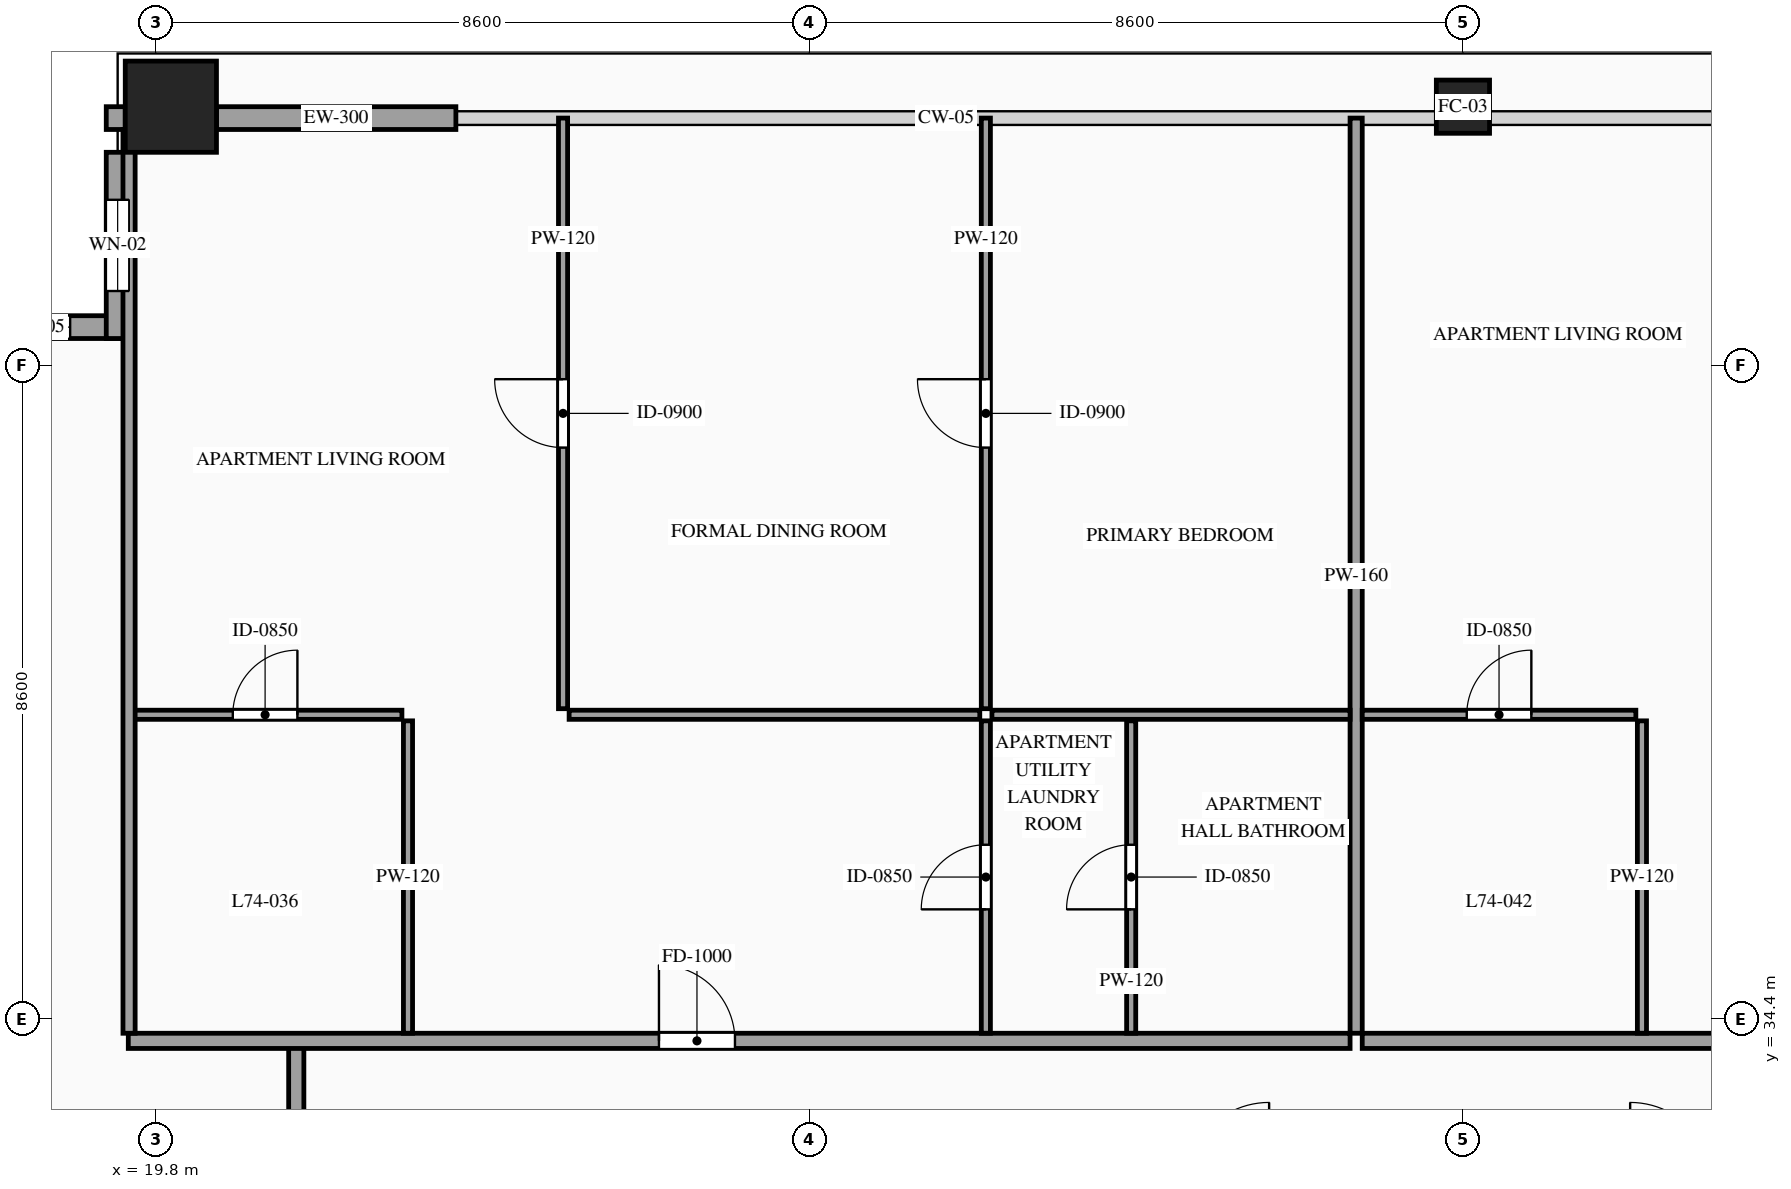
"""IFC4 building model, lengths in metres.
Left out: names, types, materials, properties, quantities, classifications, styles, units other than length and angle.
Written with IfcOpenShell. Run it as: python <this file> out.ifc"""

import sys

from ifc_helpers import new_model, si_unit, direction, frame, frame_2d, origin, origin_2d, place, context, subcontext, project, spatial, rectangle, hollow_rectangle, extrude, source, transform, mapped, element, fill, save


model = new_model("IFC4")
c1 = context("Model", 3, precision=1e-05, world=origin(), true_north=direction((0.0, 1.0)))
c2 = subcontext(c1, "Body", "Model", "MODEL_VIEW")
j1 = project(units=[si_unit("LENGTHUNIT", "METRE"), si_unit("PLANEANGLEUNIT", "RADIAN")], contexts=[c1])
p1 = place(None, origin())
s1 = spatial("IfcSite", under=j1, at=p1, CompositionType="ELEMENT")
p2 = place(p1, origin())
s2 = spatial("IfcBuilding", under=s1, at=p2, CompositionType="ELEMENT")
p3 = place(p2, frame((0.0, 0.0, 278.6)))
s3 = spatial("IfcBuildingStorey", under=s2, at=p3, CompositionType="ELEMENT", Elevation=278.6)
m1 = source(origin(), c2, "Body", "SweptSolid", [
    extrude(hollow_rectangle(XDim=1.2, YDim=1.2, WallThickness=0.055, at=origin_2d()), origin(), (0.0, 0.0, 1.0), 3.5),
])
p4 = place(p3, frame((20.0, 46.4, 0.0), z_axis=(0.0, 0.0, 1.0), x_axis=(1.0, 0.0, 0.0)))
e1 = element("IfcColumn", 1, at=p4, inside=s3, PredefinedType="COLUMN", context=c2, shape_type="MappedRepresentation", body=[
    mapped(m1, transform((0.0, 0.0, 0.0), scale=1.0)),
])
m2 = source(origin(), c2, "Body", "SweptSolid", [
    extrude(hollow_rectangle(XDim=0.7, YDim=0.7, WallThickness=0.032, at=origin_2d()), origin(), (0.0, 0.0, 1.0), 3.5),
])
p5 = place(p3, frame((37.0, 46.4, 0.0), z_axis=(0.0, 0.0, 1.0), x_axis=(1.0, 0.0, 0.0)))
e2 = element("IfcColumn", 2, at=p5, inside=s3, PredefinedType="COLUMN", context=c2, shape_type="MappedRepresentation", body=[
    mapped(m2, transform((0.0, 0.0, 0.0), scale=1.0)),
])
p6 = place(p3, frame((19.45, 43.5, 0.0), z_axis=(0.0, 0.0, 1.0), x_axis=(-1.0, 0.0, 0.0)))
e3 = element("IfcWall", 3, at=p6, inside=s3, PredefinedType="SOLIDWALL", context=c2, shape_type="SweptSolid", body=[
    extrude(rectangle(XDim=2.45, YDim=0.3, at=frame_2d((1.225, 0.0))), origin(), (0.0, 0.0, 1.0), 3.28),
])
p7 = place(p6, frame((0.775, 0.0, 0.85)))
e4 = element("IfcOpeningElement", 4, at=p7, cuts=e3, PredefinedType="OPENING", context=c2, shape_type="SweptSolid", body=[
    extrude(rectangle(XDim=0.9, YDim=1.5, at=frame_2d((0.45, 0.75))), frame((0.0, 0.165, 0.0), z_axis=(0.0, -1.0, 0.0), x_axis=(1.0, 0.0, 0.0)), (0.0, 0.0, 1.0), 0.33),
])
p8 = place(p3, frame((19.3, 45.8, 0.0), z_axis=(0.0, 0.0, 1.0), x_axis=(0.0, -1.0, 0.0)))
e5 = element("IfcWall", 5, at=p8, inside=s3, PredefinedType="SOLIDWALL", context=c2, shape_type="SweptSolid", body=[
    extrude(rectangle(XDim=2.45, YDim=0.3, at=frame_2d((1.225, 0.0))), origin(), (0.0, 0.0, 1.0), 3.28),
])
p9 = place(p8, frame((0.625, 0.0, 0.85)))
e6 = element("IfcOpeningElement", 6, at=p9, cuts=e5, PredefinedType="OPENING", context=c2, shape_type="SweptSolid", body=[
    extrude(rectangle(XDim=1.2, YDim=2.1, at=frame_2d((0.6, 1.05))), frame((0.0, 0.165, 0.0), z_axis=(0.0, -1.0, 0.0), x_axis=(1.0, 0.0, 0.0)), (0.0, 0.0, 1.0), 0.33),
])
m3 = source(origin(), c2, "Body", "SweptSolid", [
    extrude(rectangle(XDim=0.25, YDim=0.3, at=frame_2d((0.125, 0.0))), origin(), (0.0, 0.0, 1.0), 3.28),
])
p10 = place(p3, frame((19.15, 46.25, 0.0), z_axis=(0.0, 0.0, 1.0), x_axis=(1.0, 0.0, 0.0)))
e7 = element("IfcWall", 7, at=p10, inside=s3, PredefinedType="SOLIDWALL", context=c2, shape_type="MappedRepresentation", body=[
    mapped(m3, transform((0.0, 0.0, 0.0), scale=1.0)),
])
m4 = source(origin(), c2, "Body", "SweptSolid", [
    extrude(rectangle(XDim=3.15, YDim=0.3, at=frame_2d((1.575, 0.0))), origin(), (0.0, 0.0, 1.0), 2.835),
])
p11 = place(p3, frame((20.6, 46.25, 0.0), z_axis=(0.0, 0.0, 1.0), x_axis=(1.0, 0.0, 0.0)))
e8 = element("IfcWall", 8, at=p11, inside=s3, PredefinedType="SOLIDWALL", context=c2, shape_type="MappedRepresentation", body=[
    mapped(m4, transform((0.0, 0.0, 0.0), scale=1.0)),
])
m5 = source(origin(), c2, "Body", "SweptSolid", [
    extrude(rectangle(XDim=1.7, YDim=0.2, at=frame_2d((0.85, 0.0))), origin(), (0.0, 0.0, 1.0), 3.28),
])
p12 = place(p3, frame((21.65, 32.35, 0.0), z_axis=(0.0, 0.0, 1.0), x_axis=(0.0, 1.0, 0.0)))
e9 = element("IfcWall", 9, at=p12, inside=s3, PredefinedType="PARTITIONING", context=c2, shape_type="MappedRepresentation", body=[
    mapped(m5, transform((0.0, 0.0, 0.0), scale=1.0)),
])
p13 = place(p3, frame((19.44, 34.11, 0.0), z_axis=(0.0, 0.0, 1.0), x_axis=(1.0, 0.0, 0.0)))
e10 = element("IfcWall", 10, at=p13, inside=s3, PredefinedType="PARTITIONING", context=c2, shape_type="SweptSolid", body=[
    extrude(rectangle(XDim=16.075, YDim=0.2, at=frame_2d((8.038, 0.0))), origin(), (0.0, 0.0, 1.0), 3.28),
])
p14 = place(p13, frame((6.982, 0.0, 0.0)))
e11 = element("IfcOpeningElement", 11, at=p14, cuts=e10, PredefinedType="OPENING", context=c2, shape_type="SweptSolid", body=[
    extrude(rectangle(XDim=1.0, YDim=2.2, at=frame_2d((0.5, 1.1))), frame((0.0, 0.115, 0.0), z_axis=(0.0, -1.0, 0.0), x_axis=(1.0, 0.0, 0.0)), (0.0, 0.0, 1.0), 0.23),
])
m6 = source(origin(), c2, "Body", "SweptSolid", [
    extrude(rectangle(XDim=12.04, YDim=0.16, at=frame_2d((6.02, 0.0))), origin(), (0.0, 0.0, 1.0), 3.28),
])
p15 = place(p3, frame((35.595, 34.21, 0.0), z_axis=(0.0, 0.0, 1.0), x_axis=(0.0, 1.0, 0.0)))
e12 = element("IfcWall", 12, at=p15, inside=s3, PredefinedType="PARTITIONING", context=c2, shape_type="MappedRepresentation", body=[
    mapped(m6, transform((0.0, 0.0, 0.0), scale=1.0)),
])
p16 = place(p3, frame((19.44, 38.4, 0.0), z_axis=(0.0, 0.0, 1.0), x_axis=(1.0, 0.0, 0.0)))
e13 = element("IfcWall", 13, at=p16, inside=s3, PredefinedType="PARTITIONING", context=c2, shape_type="SweptSolid", body=[
    extrude(rectangle(XDim=3.6, YDim=0.12, at=frame_2d((1.8, 0.0))), origin(), (0.0, 0.0, 1.0), 3.28),
])
p17 = place(p16, frame((1.375, 0.0, 0.0)))
e14 = element("IfcOpeningElement", 14, at=p17, cuts=e13, PredefinedType="OPENING", context=c2, shape_type="SweptSolid", body=[
    extrude(rectangle(XDim=0.85, YDim=2.1, at=frame_2d((0.425, 1.05))), frame((0.0, 0.075, 0.0), z_axis=(0.0, -1.0, 0.0), x_axis=(1.0, 0.0, 0.0)), (0.0, 0.0, 1.0), 0.15),
])
m7 = source(origin(), c2, "Body", "SweptSolid", [
    extrude(rectangle(XDim=4.11, YDim=0.12, at=frame_2d((2.055, 0.0))), origin(), (0.0, 0.0, 1.0), 3.28),
])
p18 = place(p3, frame((23.12, 34.21, 0.0), z_axis=(0.0, 0.0, 1.0), x_axis=(0.0, 1.0, 0.0)))
e15 = element("IfcWall", 15, at=p18, inside=s3, PredefinedType="PARTITIONING", context=c2, shape_type="MappedRepresentation", body=[
    mapped(m7, transform((0.0, 0.0, 0.0), scale=1.0)),
])
p19 = place(p3, frame((32.635, 34.21, 0.0), z_axis=(0.0, 0.0, 1.0), x_axis=(0.0, 1.0, 0.0)))
e16 = element("IfcWall", 16, at=p19, inside=s3, PredefinedType="PARTITIONING", context=c2, shape_type="SweptSolid", body=[
    extrude(rectangle(XDim=4.11, YDim=0.12, at=frame_2d((2.055, 0.0))), origin(), (0.0, 0.0, 1.0), 3.28),
])
p20 = place(p19, frame((1.63, 0.0, 0.0)))
e17 = element("IfcOpeningElement", 17, at=p20, cuts=e16, PredefinedType="OPENING", context=c2, shape_type="SweptSolid", body=[
    extrude(rectangle(XDim=0.85, YDim=2.1, at=frame_2d((0.425, 1.05))), frame((0.0, 0.075, 0.0), z_axis=(0.0, -1.0, 0.0), x_axis=(1.0, 0.0, 0.0)), (0.0, 0.0, 1.0), 0.15),
])
m8 = source(origin(), c2, "Body", "SweptSolid", [
    extrude(rectangle(XDim=4.712, YDim=0.12, at=frame_2d((2.356, 0.0))), origin(), (0.0, 0.0, 1.0), 3.28),
])
p21 = place(p3, frame((30.803, 38.4, 0.0), z_axis=(0.0, 0.0, 1.0), x_axis=(1.0, 0.0, 0.0)))
e18 = element("IfcWall", 18, at=p21, inside=s3, PredefinedType="PARTITIONING", context=c2, shape_type="MappedRepresentation", body=[
    mapped(m8, transform((0.0, 0.0, 0.0), scale=1.0)),
])
p22 = place(p3, frame((30.723, 38.48, 0.0), z_axis=(0.0, 0.0, 1.0), x_axis=(0.0, 1.0, 0.0)))
e19 = element("IfcWall", 19, at=p22, inside=s3, PredefinedType="PARTITIONING", context=c2, shape_type="SweptSolid", body=[
    extrude(rectangle(XDim=7.77, YDim=0.12, at=frame_2d((3.885, 0.0))), origin(), (0.0, 0.0, 1.0), 3.28),
])
p23 = place(p22, frame((3.435, 0.0, 0.0)))
e20 = element("IfcOpeningElement", 20, at=p23, cuts=e19, PredefinedType="OPENING", context=c2, shape_type="SweptSolid", body=[
    extrude(rectangle(XDim=0.9, YDim=2.15, at=frame_2d((0.45, 1.075))), frame((0.0, 0.075, 0.0), z_axis=(0.0, -1.0, 0.0), x_axis=(1.0, 0.0, 0.0)), (0.0, 0.0, 1.0), 0.15),
])
p24 = place(p3, frame((30.723, 34.21, 0.0), z_axis=(0.0, 0.0, 1.0), x_axis=(0.0, 1.0, 0.0)))
e21 = element("IfcWall", 21, at=p24, inside=s3, PredefinedType="PARTITIONING", context=c2, shape_type="SweptSolid", body=[
    extrude(rectangle(XDim=4.11, YDim=0.12, at=frame_2d((2.055, 0.0))), origin(), (0.0, 0.0, 1.0), 3.28),
])
p25 = place(p24, frame((1.63, 0.0, 0.0)))
e22 = element("IfcOpeningElement", 22, at=p25, cuts=e21, PredefinedType="OPENING", context=c2, shape_type="SweptSolid", body=[
    extrude(rectangle(XDim=0.85, YDim=2.1, at=frame_2d((0.425, 1.05))), frame((0.0, 0.075, 0.0), z_axis=(0.0, -1.0, 0.0), x_axis=(1.0, 0.0, 0.0)), (0.0, 0.0, 1.0), 0.15),
])
m9 = source(origin(), c2, "Body", "SweptSolid", [
    extrude(rectangle(XDim=5.403, YDim=0.12, at=frame_2d((2.702, 0.0))), origin(), (0.0, 0.0, 1.0), 3.28),
])
p26 = place(p3, frame((25.24, 38.4, 0.0), z_axis=(0.0, 0.0, 1.0), x_axis=(1.0, 0.0, 0.0)))
e23 = element("IfcWall", 23, at=p26, inside=s3, PredefinedType="PARTITIONING", context=c2, shape_type="MappedRepresentation", body=[
    mapped(m9, transform((0.0, 0.0, 0.0), scale=1.0)),
])
p27 = place(p3, frame((25.16, 38.48, 0.0), z_axis=(0.0, 0.0, 1.0), x_axis=(0.0, 1.0, 0.0)))
e24 = element("IfcWall", 24, at=p27, inside=s3, PredefinedType="PARTITIONING", context=c2, shape_type="SweptSolid", body=[
    extrude(rectangle(XDim=7.77, YDim=0.12, at=frame_2d((3.885, 0.0))), origin(), (0.0, 0.0, 1.0), 3.28),
])
p28 = place(p27, frame((3.435, 0.0, 0.0)))
e25 = element("IfcOpeningElement", 25, at=p28, cuts=e24, PredefinedType="OPENING", context=c2, shape_type="SweptSolid", body=[
    extrude(rectangle(XDim=0.9, YDim=2.15, at=frame_2d((0.45, 1.075))), frame((0.0, 0.075, 0.0), z_axis=(0.0, -1.0, 0.0), x_axis=(1.0, 0.0, 0.0)), (0.0, 0.0, 1.0), 0.15),
])
p29 = place(p3, frame((35.675, 34.11, 0.0), z_axis=(0.0, 0.0, 1.0), x_axis=(1.0, 0.0, 0.0)))
e26 = element("IfcWall", 26, at=p29, inside=s3, PredefinedType="PARTITIONING", context=c2, shape_type="SweptSolid", body=[
    extrude(rectangle(XDim=18.885, YDim=0.2, at=frame_2d((9.442, 0.0))), origin(), (0.0, 0.0, 1.0), 3.28),
])
p30 = place(p29, frame((6.668, 0.0, 0.0)))
e27 = element("IfcOpeningElement", 27, at=p30, cuts=e26, PredefinedType="OPENING", context=c2, shape_type="SweptSolid", body=[
    extrude(rectangle(XDim=1.0, YDim=2.2, at=frame_2d((0.5, 1.1))), frame((0.0, 0.115, 0.0), z_axis=(0.0, -1.0, 0.0), x_axis=(1.0, 0.0, 0.0)), (0.0, 0.0, 1.0), 0.23),
])
m10 = source(origin(), c2, "Body", "SweptSolid", [
    extrude(rectangle(XDim=11.89, YDim=0.16, at=frame_2d((5.945, 0.0))), origin(), (0.0, 0.0, 1.0), 3.28),
])
p31 = place(p3, frame((19.45, 34.21, 0.0), z_axis=(0.0, 0.0, 1.0), x_axis=(0.0, 1.0, 0.0)))
e28 = element("IfcWall", 28, at=p31, inside=s3, PredefinedType="PARTITIONING", context=c2, shape_type="MappedRepresentation", body=[
    mapped(m10, transform((0.0, 0.0, 0.0), scale=1.0)),
])
p32 = place(p3, frame((35.675, 38.4, 0.0), z_axis=(0.0, 0.0, 1.0), x_axis=(1.0, 0.0, 0.0)))
e29 = element("IfcWall", 29, at=p32, inside=s3, PredefinedType="PARTITIONING", context=c2, shape_type="SweptSolid", body=[
    extrude(rectangle(XDim=3.6, YDim=0.12, at=frame_2d((1.8, 0.0))), origin(), (0.0, 0.0, 1.0), 3.28),
])
p33 = place(p32, frame((1.375, 0.0, 0.0)))
e30 = element("IfcOpeningElement", 30, at=p33, cuts=e29, PredefinedType="OPENING", context=c2, shape_type="SweptSolid", body=[
    extrude(rectangle(XDim=0.85, YDim=2.1, at=frame_2d((0.425, 1.05))), frame((0.0, 0.075, 0.0), z_axis=(0.0, -1.0, 0.0), x_axis=(1.0, 0.0, 0.0)), (0.0, 0.0, 1.0), 0.15),
])
p34 = place(p3, frame((39.355, 34.21, 0.0), z_axis=(0.0, 0.0, 1.0), x_axis=(0.0, 1.0, 0.0)))
e31 = element("IfcWall", 31, at=p34, inside=s3, PredefinedType="PARTITIONING", context=c2, shape_type="MappedRepresentation", body=[
    mapped(m7, transform((0.0, 0.0, 0.0), scale=1.0)),
])
m11 = source(origin(), c2, "Body", "SweptSolid", [
    extrude(rectangle(XDim=0.9, YDim=1.5, at=frame_2d((0.45, 0.75))), frame((0.0, 0.03, 0.0), z_axis=(0.0, -1.0, 0.0), x_axis=(1.0, 0.0, 0.0)), (0.0, 0.0, 1.0), 0.06),
])
p35 = place(p7, origin())
e32 = element("IfcWindow", 32, at=p35, inside=s3, PartitioningType="SINGLE_PANEL", PredefinedType="WINDOW", context=c2, shape_type="MappedRepresentation", body=[
    mapped(m11, transform((0.0, 0.0, 0.0), scale=1.0)),
])
fill(e4, e32)
m12 = source(origin(), c2, "Body", "SweptSolid", [
    extrude(rectangle(XDim=1.2, YDim=2.1, at=frame_2d((0.6, 1.05))), frame((0.0, 0.03, 0.0), z_axis=(0.0, -1.0, 0.0), x_axis=(1.0, 0.0, 0.0)), (0.0, 0.0, 1.0), 0.06),
])
p36 = place(p9, origin())
e33 = element("IfcWindow", 33, at=p36, inside=s3, PartitioningType="SINGLE_PANEL", PredefinedType="WINDOW", context=c2, shape_type="MappedRepresentation", body=[
    mapped(m12, transform((0.0, 0.0, 0.0), scale=1.0)),
])
fill(e6, e33)
m13 = source(origin(), c2, "Body", "SweptSolid", [
    extrude(rectangle(XDim=1.0, YDim=2.2, at=frame_2d((0.5, 1.1))), frame((0.0, 0.025, 0.0), z_axis=(0.0, -1.0, 0.0), x_axis=(1.0, 0.0, 0.0)), (0.0, 0.0, 1.0), 0.05),
])
p37 = place(p14, origin())
e34 = element("IfcDoor", 34, at=p37, inside=s3, OperationType="SINGLE_SWING_LEFT", PredefinedType="DOOR", context=c2, shape_type="MappedRepresentation", body=[
    mapped(m13, transform((0.0, 0.0, 0.0), scale=1.0)),
])
fill(e11, e34)
m14 = source(origin(), c2, "Body", "SweptSolid", [
    extrude(rectangle(XDim=0.85, YDim=2.1, at=frame_2d((0.425, 1.05))), frame((0.0, 0.025, 0.0), z_axis=(0.0, -1.0, 0.0), x_axis=(1.0, 0.0, 0.0)), (0.0, 0.0, 1.0), 0.05),
])
p38 = place(p17, origin())
e35 = element("IfcDoor", 35, at=p38, inside=s3, OperationType="SINGLE_SWING_RIGHT", PredefinedType="DOOR", context=c2, shape_type="MappedRepresentation", body=[
    mapped(m14, transform((0.0, 0.0, 0.0), scale=1.0)),
])
fill(e14, e35)
p39 = place(p20, origin())
e36 = element("IfcDoor", 36, at=p39, inside=s3, OperationType="SINGLE_SWING_LEFT", PredefinedType="DOOR", context=c2, shape_type="MappedRepresentation", body=[
    mapped(m14, transform((0.0, 0.0, 0.0), scale=1.0)),
])
fill(e17, e36)
m15 = source(origin(), c2, "Body", "SweptSolid", [
    extrude(rectangle(XDim=0.9, YDim=2.15, at=frame_2d((0.45, 1.075))), frame((0.0, 0.025, 0.0), z_axis=(0.0, -1.0, 0.0), x_axis=(1.0, 0.0, 0.0)), (0.0, 0.0, 1.0), 0.05),
])
p40 = place(p23, origin())
e37 = element("IfcDoor", 37, at=p40, inside=s3, OperationType="SINGLE_SWING_RIGHT", PredefinedType="DOOR", context=c2, shape_type="MappedRepresentation", body=[
    mapped(m15, transform((0.0, 0.0, 0.0), scale=1.0)),
])
fill(e20, e37)
p41 = place(p25, origin())
e38 = element("IfcDoor", 38, at=p41, inside=s3, OperationType="SINGLE_SWING_LEFT", PredefinedType="DOOR", context=c2, shape_type="MappedRepresentation", body=[
    mapped(m14, transform((0.0, 0.0, 0.0), scale=1.0)),
])
fill(e22, e38)
p42 = place(p28, origin())
e39 = element("IfcDoor", 39, at=p42, inside=s3, OperationType="SINGLE_SWING_RIGHT", PredefinedType="DOOR", context=c2, shape_type="MappedRepresentation", body=[
    mapped(m15, transform((0.0, 0.0, 0.0), scale=1.0)),
])
fill(e25, e39)
p43 = place(p33, origin())
e40 = element("IfcDoor", 40, at=p43, inside=s3, OperationType="SINGLE_SWING_RIGHT", PredefinedType="DOOR", context=c2, shape_type="MappedRepresentation", body=[
    mapped(m14, transform((0.0, 0.0, 0.0), scale=1.0)),
])
fill(e30, e40)
save(model, sys.argv[1])
